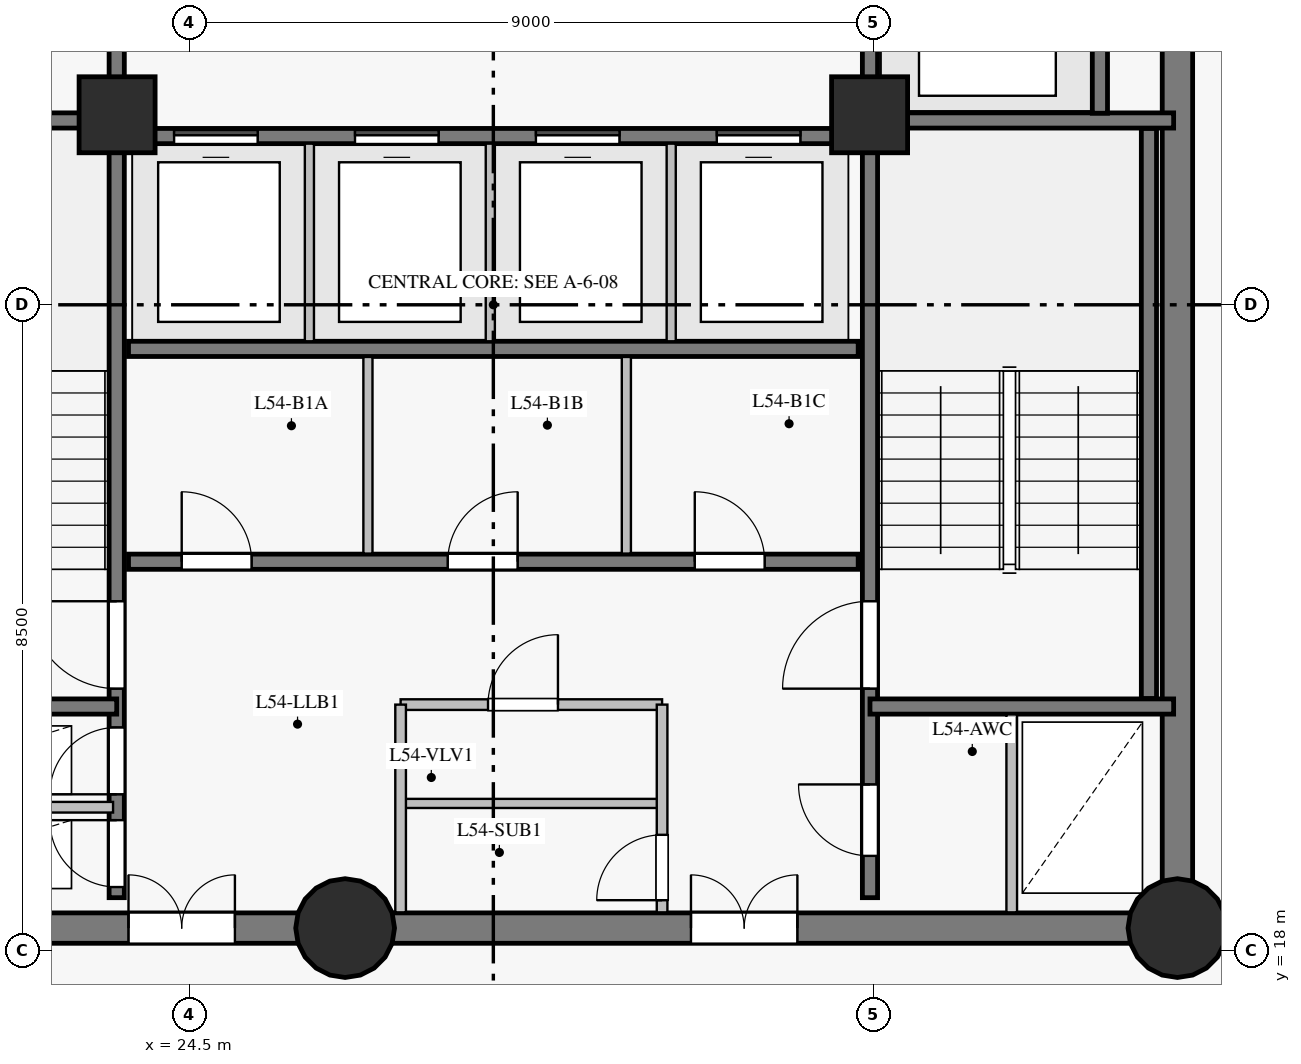
"""IFC4 building model, lengths in metres.
Left out: names, types, materials, properties, quantities, classifications, styles, units other than length and angle.
Written with IfcOpenShell. Run it as: python <this file> out.ifc"""

import sys

from ifc_helpers import new_model, si_unit, direction, frame, frame_2d, origin, origin_with_axes, origin_2d, place, context, subcontext, project, spatial, rectangle, circle, extrude, source, transform, mapped, element, fill, save


model = new_model("IFC4")
c1 = context("Model", 3, precision=1e-05, world=origin(), true_north=direction((0.0, 1.0)))
c2 = subcontext(c1, "Body", "Model", "MODEL_VIEW")
j1 = project(units=[si_unit("LENGTHUNIT", "METRE"), si_unit("PLANEANGLEUNIT", "RADIAN")], contexts=[c1])
p1 = place(None, origin())
s1 = spatial("IfcSite", under=j1, at=p1, CompositionType="ELEMENT")
p2 = place(p1, origin())
s2 = spatial("IfcBuilding", under=s1, at=p2, CompositionType="ELEMENT")
p3 = place(p2, frame((0.0, 0.0, 187.05)))
s3 = spatial("IfcBuildingStorey", under=s2, at=p3, CompositionType="ELEMENT", Elevation=187.05)
p4 = place(p3, frame((19.5, 18.3, 0.0), z_axis=(0.0, 0.0, 1.0), x_axis=(1.0, 0.0, 0.0)))
e1 = element("IfcWall", 1, at=p4, inside=s3, PredefinedType="SHEAR", context=c2, shape_type="SweptSolid", body=[
    extrude(rectangle(XDim=7.05, YDim=0.4, at=frame_2d((3.525, 0.0))), origin(), (0.0, 0.0, 1.0), 2.825),
])
p5 = place(p4, frame((4.2, 0.0, 0.0)))
e2 = element("IfcOpeningElement", 2, at=p5, cuts=e1, PredefinedType="OPENING", context=c2, shape_type="SweptSolid", body=[
    extrude(rectangle(XDim=1.4, YDim=2.2, at=frame_2d((0.7, 1.1))), frame((0.0, 0.21, 0.0), z_axis=(0.0, -1.0, 0.0), x_axis=(1.0, 0.0, 0.0)), (0.0, 0.0, 1.0), 0.42),
])
p6 = place(p3, frame((26.55, 18.3, 0.0), z_axis=(0.0, 0.0, 1.0), x_axis=(1.0, 0.0, 0.0)))
e3 = element("IfcWall", 3, at=p6, inside=s3, PredefinedType="SHEAR", context=c2, shape_type="SweptSolid", body=[
    extrude(rectangle(XDim=10.95, YDim=0.4, at=frame_2d((5.475, 0.0))), origin(), (0.0, 0.0, 1.0), 2.825),
])
p7 = place(p6, frame((4.55, 0.0, 0.0)))
e4 = element("IfcOpeningElement", 4, at=p7, cuts=e3, PredefinedType="OPENING", context=c2, shape_type="SweptSolid", body=[
    extrude(rectangle(XDim=1.4, YDim=2.2, at=frame_2d((0.7, 1.1))), frame((0.0, 0.21, 0.0), z_axis=(0.0, -1.0, 0.0), x_axis=(1.0, 0.0, 0.0)), (0.0, 0.0, 1.0), 0.42),
])
p8 = place(p3, frame((37.5, 18.3, 0.0), z_axis=(0.0, 0.0, 1.0), x_axis=(0.0, 1.0, 0.0)))
e5 = element("IfcWall", 5, at=p8, inside=s3, PredefinedType="SHEAR", context=c2, shape_type="SweptSolid", body=[
    extrude(rectangle(XDim=16.4, YDim=0.4, at=frame_2d((8.2, 0.0))), origin(), (0.0, 0.0, 1.0), 2.825),
])
p9 = place(p8, frame((14.15, 0.0, 0.0)))
e6 = element("IfcOpeningElement", 6, at=p9, cuts=e5, PredefinedType="OPENING", context=c2, shape_type="SweptSolid", body=[
    extrude(rectangle(XDim=1.2, YDim=2.15, at=frame_2d((0.6, 1.075))), frame((0.0, 0.21, 0.0), z_axis=(0.0, -1.0, 0.0), x_axis=(1.0, 0.0, 0.0)), (0.0, 0.0, 1.0), 0.42),
])
m1 = source(origin_with_axes(), c2, "Body", "SweptSolid", [
    extrude(circle(Radius=0.65, at=origin_2d()), origin(), (0.0, 0.0, 1.0), 3.05),
])
for number, where, z_axis, x_axis in (
    (7, (26.55, 18.3, 0.0), (0.0, 0.0, 1.0), (1.0, 0.0, 0.0)),
    (8, (37.5, 18.3, 0.0), (0.0, 0.0, 1.0), (1.0, 0.0, 0.0)),
):
    element("IfcColumn", number, at=place(p3, frame(where, z_axis=z_axis, x_axis=x_axis)), inside=s3, PredefinedType="COLUMN", context=c2, shape_type="MappedRepresentation", body=[
        mapped(m1, transform((0.0, 0.0, 0.0), scale=1.0)),
    ])
m2 = source(origin_with_axes(), c2, "Body", "SweptSolid", [
    extrude(rectangle(XDim=1.0, YDim=1.0, at=origin_2d()), origin(), (0.0, 0.0, 1.0), 3.05),
])
for number, where, z_axis, x_axis in (
    (9, (23.55, 29.0, 0.0), (0.0, 0.0, 1.0), (1.0, 0.0, 0.0)),
    (10, (33.45, 29.0, 0.0), (0.0, 0.0, 1.0), (1.0, 0.0, 0.0)),
):
    element("IfcColumn", number, at=place(p3, frame(where, z_axis=z_axis, x_axis=x_axis)), inside=s3, PredefinedType="COLUMN", context=c2, shape_type="MappedRepresentation", body=[
        mapped(m2, transform((0.0, 0.0, 0.0), scale=1.0)),
    ])
p10 = place(p3, frame((23.545, 18.7, 0.0), z_axis=(0.0, 0.0, 1.0), x_axis=(0.0, 1.0, 0.0)))
e11 = element("IfcWall", 11, at=p10, inside=s3, PredefinedType="SHEAR", context=c2, shape_type="SweptSolid", body=[
    extrude(rectangle(XDim=15.6, YDim=0.2, at=frame_2d((7.8, 0.0))), origin(), (0.0, 0.0, 1.0), 2.825),
])
p11 = place(p10, frame((2.75, 0.0, 0.0)))
e12 = element("IfcOpeningElement", 12, at=p11, cuts=e11, PredefinedType="OPENING", context=c2, shape_type="SweptSolid", body=[
    extrude(rectangle(XDim=1.15, YDim=2.15, at=frame_2d((0.575, 1.075))), frame((0.0, 0.11, 0.0), z_axis=(0.0, -1.0, 0.0), x_axis=(1.0, 0.0, 0.0)), (0.0, 0.0, 1.0), 0.22),
])
p12 = place(p10, frame((0.14, 0.0, 0.0)))
e13 = element("IfcOpeningElement", 13, at=p12, cuts=e11, PredefinedType="OPENING", context=c2, shape_type="SweptSolid", body=[
    extrude(rectangle(XDim=0.88, YDim=2.1, at=frame_2d((0.44, 1.05))), frame((0.0, 0.11, 0.0), z_axis=(0.0, -1.0, 0.0), x_axis=(1.0, 0.0, 0.0)), (0.0, 0.0, 1.0), 0.22),
])
p13 = place(p10, frame((1.36, 0.0, 0.0)))
e14 = element("IfcOpeningElement", 14, at=p13, cuts=e11, PredefinedType="OPENING", context=c2, shape_type="SweptSolid", body=[
    extrude(rectangle(XDim=0.88, YDim=2.1, at=frame_2d((0.44, 1.05))), frame((0.0, 0.11, 0.0), z_axis=(0.0, -1.0, 0.0), x_axis=(1.0, 0.0, 0.0)), (0.0, 0.0, 1.0), 0.22),
])
p14 = place(p10, frame((12.1, 0.0, 0.0)))
e15 = element("IfcOpeningElement", 15, at=p14, cuts=e11, PredefinedType="OPENING", context=c2, shape_type="SweptSolid", body=[
    extrude(rectangle(XDim=1.12, YDim=2.15, at=frame_2d((0.56, 1.075))), frame((0.0, 0.11, 0.0), z_axis=(0.0, -1.0, 0.0), x_axis=(1.0, 0.0, 0.0)), (0.0, 0.0, 1.0), 0.22),
])
p15 = place(p10, frame((14.05, 0.0, 0.0)))
e16 = element("IfcOpeningElement", 16, at=p15, cuts=e11, PredefinedType="OPENING", context=c2, shape_type="SweptSolid", body=[
    extrude(rectangle(XDim=1.12, YDim=2.15, at=frame_2d((0.56, 1.075))), frame((0.0, 0.11, 0.0), z_axis=(0.0, -1.0, 0.0), x_axis=(1.0, 0.0, 0.0)), (0.0, 0.0, 1.0), 0.22),
])
p16 = place(p3, frame((33.455, 18.7, 0.0), z_axis=(0.0, 0.0, 1.0), x_axis=(0.0, 1.0, 0.0)))
e17 = element("IfcWall", 17, at=p16, inside=s3, PredefinedType="SHEAR", context=c2, shape_type="SweptSolid", body=[
    extrude(rectangle(XDim=15.6, YDim=0.2, at=frame_2d((7.8, 0.0))), origin(), (0.0, 0.0, 1.0), 2.825),
])
p17 = place(p16, frame((2.75, 0.0, 0.0)))
e18 = element("IfcOpeningElement", 18, at=p17, cuts=e17, PredefinedType="OPENING", context=c2, shape_type="SweptSolid", body=[
    extrude(rectangle(XDim=1.15, YDim=2.15, at=frame_2d((0.575, 1.075))), frame((0.0, 0.11, 0.0), z_axis=(0.0, -1.0, 0.0), x_axis=(1.0, 0.0, 0.0)), (0.0, 0.0, 1.0), 0.22),
])
p18 = place(p16, frame((0.55, 0.0, 0.0)))
e19 = element("IfcOpeningElement", 19, at=p18, cuts=e17, PredefinedType="OPENING", context=c2, shape_type="SweptSolid", body=[
    extrude(rectangle(XDim=0.94, YDim=2.1, at=frame_2d((0.47, 1.05))), frame((0.0, 0.11, 0.0), z_axis=(0.0, -1.0, 0.0), x_axis=(1.0, 0.0, 0.0)), (0.0, 0.0, 1.0), 0.22),
])
p19 = place(p3, frame((23.7, 23.12, 0.0), z_axis=(0.0, 0.0, 1.0), x_axis=(1.0, 0.0, 0.0)))
e20 = element("IfcWall", 20, at=p19, inside=s3, PredefinedType="SHEAR", context=c2, shape_type="SweptSolid", body=[
    extrude(rectangle(XDim=9.6, YDim=0.2, at=frame_2d((4.8, 0.0))), origin(), (0.0, 0.0, 1.0), 2.825),
])
p20 = place(p19, frame((0.7, 0.0, 0.0)))
e21 = element("IfcOpeningElement", 21, at=p20, cuts=e20, PredefinedType="OPENING", context=c2, shape_type="SweptSolid", body=[
    extrude(rectangle(XDim=0.92, YDim=2.1, at=frame_2d((0.46, 1.05))), frame((0.0, 0.11, 0.0), z_axis=(0.0, -1.0, 0.0), x_axis=(1.0, 0.0, 0.0)), (0.0, 0.0, 1.0), 0.22),
])
p21 = place(p19, frame((4.2, 0.0, 0.0)))
e22 = element("IfcOpeningElement", 22, at=p21, cuts=e20, PredefinedType="OPENING", context=c2, shape_type="SweptSolid", body=[
    extrude(rectangle(XDim=0.92, YDim=2.1, at=frame_2d((0.46, 1.05))), frame((0.0, 0.11, 0.0), z_axis=(0.0, -1.0, 0.0), x_axis=(1.0, 0.0, 0.0)), (0.0, 0.0, 1.0), 0.22),
])
p22 = place(p19, frame((7.45, 0.0, 0.0)))
e23 = element("IfcOpeningElement", 23, at=p22, cuts=e20, PredefinedType="OPENING", context=c2, shape_type="SweptSolid", body=[
    extrude(rectangle(XDim=0.92, YDim=2.1, at=frame_2d((0.46, 1.05))), frame((0.0, 0.11, 0.0), z_axis=(0.0, -1.0, 0.0), x_axis=(1.0, 0.0, 0.0)), (0.0, 0.0, 1.0), 0.22),
])
p23 = place(p3, frame((23.7, 25.92, 0.0), z_axis=(0.0, 0.0, 1.0), x_axis=(1.0, 0.0, 0.0)))
e24 = element("IfcWall", 24, at=p23, inside=s3, PredefinedType="SHEAR", context=c2, shape_type="SweptSolid", body=[
    extrude(rectangle(XDim=9.6, YDim=0.2, at=frame_2d((4.8, 0.0))), origin(), (0.0, 0.0, 1.0), 2.825),
])
p24 = place(p3, frame((23.7, 28.72, 0.0), z_axis=(0.0, 0.0, 1.0), x_axis=(1.0, 0.0, 0.0)))
e25 = element("IfcWall", 25, at=p24, inside=s3, PredefinedType="SHEAR", context=c2, shape_type="SweptSolid", body=[
    extrude(rectangle(XDim=9.6, YDim=0.2, at=frame_2d((4.8, 0.0))), origin(), (0.0, 0.0, 1.0), 2.825),
])
p25 = place(p24, frame((0.6, 0.0, 0.0)))
e26 = element("IfcOpeningElement", 26, at=p25, cuts=e25, PredefinedType="OPENING", context=c2, shape_type="SweptSolid", body=[
    extrude(rectangle(XDim=1.1, YDim=2.15, at=frame_2d((0.55, 1.075))), frame((0.0, 0.11, 0.0), z_axis=(0.0, -1.0, 0.0), x_axis=(1.0, 0.0, 0.0)), (0.0, 0.0, 1.0), 0.22),
])
p26 = place(p24, frame((2.98, 0.0, 0.0)))
e27 = element("IfcOpeningElement", 27, at=p26, cuts=e25, PredefinedType="OPENING", context=c2, shape_type="SweptSolid", body=[
    extrude(rectangle(XDim=1.1, YDim=2.15, at=frame_2d((0.55, 1.075))), frame((0.0, 0.11, 0.0), z_axis=(0.0, -1.0, 0.0), x_axis=(1.0, 0.0, 0.0)), (0.0, 0.0, 1.0), 0.22),
])
p27 = place(p24, frame((5.36, 0.0, 0.0)))
e28 = element("IfcOpeningElement", 28, at=p27, cuts=e25, PredefinedType="OPENING", context=c2, shape_type="SweptSolid", body=[
    extrude(rectangle(XDim=1.1, YDim=2.15, at=frame_2d((0.55, 1.075))), frame((0.0, 0.11, 0.0), z_axis=(0.0, -1.0, 0.0), x_axis=(1.0, 0.0, 0.0)), (0.0, 0.0, 1.0), 0.22),
])
p28 = place(p24, frame((7.74, 0.0, 0.0)))
e29 = element("IfcOpeningElement", 29, at=p28, cuts=e25, PredefinedType="OPENING", context=c2, shape_type="SweptSolid", body=[
    extrude(rectangle(XDim=1.1, YDim=2.15, at=frame_2d((0.55, 1.075))), frame((0.0, 0.11, 0.0), z_axis=(0.0, -1.0, 0.0), x_axis=(1.0, 0.0, 0.0)), (0.0, 0.0, 1.0), 0.22),
])
p29 = place(p3, frame((37.125, 21.32, 0.0), z_axis=(0.0, 0.0, 1.0), x_axis=(0.0, 1.0, 0.0)))
e30 = element("IfcWall", 30, at=p29, inside=s3, PredefinedType="SHEAR", context=c2, shape_type="SweptSolid", body=[
    extrude(rectangle(XDim=7.5, YDim=0.2, at=frame_2d((3.75, 0.0))), origin(), (0.0, 0.0, 1.0), 2.825),
])
for number, where, z_axis, x_axis in (
    (31, (33.455, 21.215, 0.0), (0.0, 0.0, 1.0), (1.0, 0.0, 0.0)),
    (32, (33.455, 28.925, 0.0), (0.0, 0.0, 1.0), (1.0, 0.0, 0.0)),
    (33, (19.55, 21.215, 0.0), (0.0, 0.0, 1.0), (1.0, 0.0, 0.0)),
    (34, (19.55, 28.925, 0.0), (0.0, 0.0, 1.0), (1.0, 0.0, 0.0)),
):
    element("IfcWall", number, at=place(p3, frame(where, z_axis=z_axis, x_axis=x_axis)), inside=s3, PredefinedType="SHEAR", context=c2, shape_type="SweptSolid", body=[
        extrude(rectangle(XDim=3.995, YDim=0.2, at=frame_2d((1.998, 0.0))), origin(), (0.0, 0.0, 1.0), 2.825),
    ])
p30 = place(p3, frame((36.48, 29.02, 0.0), z_axis=(0.0, 0.0, 1.0), x_axis=(0.0, 1.0, 0.0)))
e35 = element("IfcWall", 35, at=p30, inside=s3, PredefinedType="SHEAR", context=c2, shape_type="SweptSolid", body=[
    extrude(rectangle(XDim=2.86, YDim=0.2, at=frame_2d((1.43, 0.0))), origin(), (0.0, 0.0, 1.0), 2.825),
])
p31 = place(p3, frame((19.707, 19.89, 0.0), z_axis=(0.0, 0.0, 1.0), x_axis=(1.0, 0.0, 0.0)))
e36 = element("IfcWall", 36, at=p31, inside=s3, PredefinedType="PARTITIONING", context=c2, shape_type="SweptSolid", body=[
    extrude(rectangle(XDim=3.79, YDim=0.14, at=frame_2d((1.895, 0.0))), origin(), (0.0, 0.0, 1.0), 2.825),
])
p32 = place(p3, frame((27.28, 21.24, 0.0), z_axis=(0.0, 0.0, 1.0), x_axis=(1.0, 0.0, 0.0)))
e37 = element("IfcWall", 37, at=p32, inside=s3, PredefinedType="PARTITIONING", context=c2, shape_type="SweptSolid", body=[
    extrude(rectangle(XDim=3.44, YDim=0.14, at=frame_2d((1.72, 0.0))), origin(), (0.0, 0.0, 1.0), 2.825),
])
p33 = place(p32, frame((1.15, 0.0, 0.0)))
e38 = element("IfcOpeningElement", 38, at=p33, cuts=e37, PredefinedType="OPENING", context=c2, shape_type="SweptSolid", body=[
    extrude(rectangle(XDim=0.92, YDim=2.1, at=frame_2d((0.46, 1.05))), frame((0.0, 0.08, 0.0), z_axis=(0.0, -1.0, 0.0), x_axis=(1.0, 0.0, 0.0)), (0.0, 0.0, 1.0), 0.16),
])
p34 = place(p3, frame((27.28, 19.94, 0.0), z_axis=(0.0, 0.0, 1.0), x_axis=(1.0, 0.0, 0.0)))
e39 = element("IfcWall", 39, at=p34, inside=s3, PredefinedType="PARTITIONING", context=c2, shape_type="SweptSolid", body=[
    extrude(rectangle(XDim=3.44, YDim=0.12, at=frame_2d((1.72, 0.0))), origin(), (0.0, 0.0, 1.0), 2.825),
])
p35 = place(p3, frame((27.28, 18.507, 0.0), z_axis=(0.0, 0.0, 1.0), x_axis=(0.0, 1.0, 0.0)))
e40 = element("IfcWall", 40, at=p35, inside=s3, PredefinedType="PARTITIONING", context=c2, shape_type="SweptSolid", body=[
    extrude(rectangle(XDim=2.733, YDim=0.14, at=frame_2d((1.366, 0.0))), origin(), (0.0, 0.0, 1.0), 2.825),
])
p36 = place(p3, frame((30.72, 18.507, 0.0), z_axis=(0.0, 0.0, 1.0), x_axis=(0.0, 1.0, 0.0)))
e41 = element("IfcWall", 41, at=p36, inside=s3, PredefinedType="PARTITIONING", context=c2, shape_type="SweptSolid", body=[
    extrude(rectangle(XDim=2.733, YDim=0.14, at=frame_2d((1.366, 0.0))), origin(), (0.0, 0.0, 1.0), 2.825),
])
p37 = place(p36, frame((0.16, 0.0, 0.0)))
e42 = element("IfcOpeningElement", 42, at=p37, cuts=e41, PredefinedType="OPENING", context=c2, shape_type="SweptSolid", body=[
    extrude(rectangle(XDim=0.86, YDim=2.1, at=frame_2d((0.43, 1.05))), frame((0.0, 0.08, 0.0), z_axis=(0.0, -1.0, 0.0), x_axis=(1.0, 0.0, 0.0)), (0.0, 0.0, 1.0), 0.16),
])
for number, where, z_axis, x_axis in (
    (43, (26.08, 26.02, 0.0), (0.0, 0.0, 1.0), (0.0, 1.0, 0.0)),
    (44, (28.46, 26.02, 0.0), (0.0, 0.0, 1.0), (0.0, 1.0, 0.0)),
    (45, (30.84, 26.02, 0.0), (0.0, 0.0, 1.0), (0.0, 1.0, 0.0)),
):
    element("IfcWall", number, at=place(p3, frame(where, z_axis=z_axis, x_axis=x_axis)), inside=s3, PredefinedType="PARTITIONING", context=c2, shape_type="SweptSolid", body=[
        extrude(rectangle(XDim=2.6, YDim=0.12, at=frame_2d((1.3, 0.0))), origin(), (0.0, 0.0, 1.0), 2.825),
    ])
for number, where, z_axis, x_axis in (
    (46, (26.85, 23.227, 0.0), (0.0, 0.0, 1.0), (0.0, 1.0, 0.0)),
    (47, (30.25, 23.227, 0.0), (0.0, 0.0, 1.0), (0.0, 1.0, 0.0)),
):
    element("IfcWall", number, at=place(p3, frame(where, z_axis=z_axis, x_axis=x_axis)), inside=s3, PredefinedType="PARTITIONING", context=c2, shape_type="SweptSolid", body=[
        extrude(rectangle(XDim=2.587, YDim=0.12, at=frame_2d((1.293, 0.0))), origin(), (0.0, 0.0, 1.0), 2.825),
    ])
p38 = place(p3, frame((35.32, 18.507, 0.0), z_axis=(0.0, 0.0, 1.0), x_axis=(0.0, 1.0, 0.0)))
e48 = element("IfcWall", 48, at=p38, inside=s3, PredefinedType="PARTITIONING", context=c2, shape_type="SweptSolid", body=[
    extrude(rectangle(XDim=2.604, YDim=0.14, at=frame_2d((1.302, 0.0))), origin(), (0.0, 0.0, 1.0), 2.825),
])
m3 = source(origin_with_axes(), c2, "Body", "SweptSolid", [
    extrude(rectangle(XDim=1.15, YDim=2.15, at=frame_2d((0.575, 1.075))), frame((0.0, 0.025, 0.0), z_axis=(0.0, -1.0, 0.0), x_axis=(1.0, 0.0, 0.0)), (0.0, 0.0, 1.0), 0.05),
])
p39 = place(p11, origin())
e49 = element("IfcDoor", 49, at=p39, inside=s3, OperationType="SINGLE_SWING_RIGHT", PredefinedType="DOOR", context=c2, shape_type="MappedRepresentation", body=[
    mapped(m3, transform((0.0, 0.0, 0.0), scale=1.0)),
])
fill(e12, e49)
p40 = place(p17, origin())
e50 = element("IfcDoor", 50, at=p40, inside=s3, OperationType="SINGLE_SWING_LEFT", PredefinedType="DOOR", context=c2, shape_type="MappedRepresentation", body=[
    mapped(m3, transform((0.0, 0.0, 0.0), scale=1.0)),
])
fill(e18, e50)
m4 = source(origin_with_axes(), c2, "Body", "SweptSolid", [
    extrude(rectangle(XDim=0.88, YDim=2.1, at=frame_2d((0.44, 1.05))), frame((0.0, 0.025, 0.0), z_axis=(0.0, -1.0, 0.0), x_axis=(1.0, 0.0, 0.0)), (0.0, 0.0, 1.0), 0.05),
])
p41 = place(p12, origin())
e51 = element("IfcDoor", 51, at=p41, inside=s3, OperationType="SINGLE_SWING_RIGHT", PredefinedType="DOOR", context=c2, shape_type="MappedRepresentation", body=[
    mapped(m4, transform((0.0, 0.0, 0.0), scale=1.0)),
])
fill(e13, e51)
p42 = place(p13, origin())
e52 = element("IfcDoor", 52, at=p42, inside=s3, OperationType="SINGLE_SWING_LEFT", PredefinedType="DOOR", context=c2, shape_type="MappedRepresentation", body=[
    mapped(m4, transform((0.0, 0.0, 0.0), scale=1.0)),
])
fill(e14, e52)
m5 = source(origin_with_axes(), c2, "Body", "SweptSolid", [
    extrude(rectangle(XDim=1.4, YDim=2.2, at=frame_2d((0.7, 1.1))), frame((0.0, 0.025, 0.0), z_axis=(0.0, -1.0, 0.0), x_axis=(1.0, 0.0, 0.0)), (0.0, 0.0, 1.0), 0.05),
])
p43 = place(p5, origin())
e53 = element("IfcDoor", 53, at=p43, inside=s3, OperationType="DOUBLE_DOOR_SINGLE_SWING", PredefinedType="DOOR", context=c2, shape_type="MappedRepresentation", body=[
    mapped(m5, transform((0.0, 0.0, 0.0), scale=1.0)),
])
fill(e2, e53)
p44 = place(p7, origin())
e54 = element("IfcDoor", 54, at=p44, inside=s3, OperationType="DOUBLE_DOOR_SINGLE_SWING", PredefinedType="DOOR", context=c2, shape_type="MappedRepresentation", body=[
    mapped(m5, transform((0.0, 0.0, 0.0), scale=1.0)),
])
fill(e4, e54)
m6 = source(origin_with_axes(), c2, "Body", "SweptSolid", [
    extrude(rectangle(XDim=0.94, YDim=2.1, at=frame_2d((0.47, 1.05))), frame((0.0, 0.025, 0.0), z_axis=(0.0, -1.0, 0.0), x_axis=(1.0, 0.0, 0.0)), (0.0, 0.0, 1.0), 0.05),
])
p45 = place(p18, origin())
e55 = element("IfcDoor", 55, at=p45, inside=s3, OperationType="SINGLE_SWING_RIGHT", PredefinedType="DOOR", context=c2, shape_type="MappedRepresentation", body=[
    mapped(m6, transform((0.0, 0.0, 0.0), scale=1.0)),
])
fill(e19, e55)
m7 = source(origin_with_axes(), c2, "Body", "SweptSolid", [
    extrude(rectangle(XDim=0.86, YDim=2.1, at=frame_2d((0.43, 1.05))), frame((0.0, 0.025, 0.0), z_axis=(0.0, -1.0, 0.0), x_axis=(1.0, 0.0, 0.0)), (0.0, 0.0, 1.0), 0.05),
])
p46 = place(p37, origin())
e56 = element("IfcDoor", 56, at=p46, inside=s3, OperationType="SINGLE_SWING_LEFT", PredefinedType="DOOR", context=c2, shape_type="MappedRepresentation", body=[
    mapped(m7, transform((0.0, 0.0, 0.0), scale=1.0)),
])
fill(e42, e56)
m8 = source(origin_with_axes(), c2, "Body", "SweptSolid", [
    extrude(rectangle(XDim=0.92, YDim=2.1, at=frame_2d((0.46, 1.05))), frame((0.0, 0.025, 0.0), z_axis=(0.0, -1.0, 0.0), x_axis=(1.0, 0.0, 0.0)), (0.0, 0.0, 1.0), 0.05),
])
p47 = place(p33, origin())
e57 = element("IfcDoor", 57, at=p47, inside=s3, OperationType="SINGLE_SWING_RIGHT", PredefinedType="DOOR", context=c2, shape_type="MappedRepresentation", body=[
    mapped(m8, transform((0.0, 0.0, 0.0), scale=1.0)),
])
fill(e38, e57)
p48 = place(p20, origin())
e58 = element("IfcDoor", 58, at=p48, inside=s3, OperationType="SINGLE_SWING_LEFT", PredefinedType="DOOR", context=c2, shape_type="MappedRepresentation", body=[
    mapped(m8, transform((0.0, 0.0, 0.0), scale=1.0)),
])
fill(e21, e58)
p49 = place(p21, origin())
e59 = element("IfcDoor", 59, at=p49, inside=s3, OperationType="SINGLE_SWING_RIGHT", PredefinedType="DOOR", context=c2, shape_type="MappedRepresentation", body=[
    mapped(m8, transform((0.0, 0.0, 0.0), scale=1.0)),
])
fill(e22, e59)
p50 = place(p22, origin())
e60 = element("IfcDoor", 60, at=p50, inside=s3, OperationType="SINGLE_SWING_LEFT", PredefinedType="DOOR", context=c2, shape_type="MappedRepresentation", body=[
    mapped(m8, transform((0.0, 0.0, 0.0), scale=1.0)),
])
fill(e23, e60)
m9 = source(origin_with_axes(), c2, "Body", "SweptSolid", [
    extrude(rectangle(XDim=1.1, YDim=2.15, at=frame_2d((0.55, 1.075))), frame((0.0, 0.025, 0.0), z_axis=(0.0, -1.0, 0.0), x_axis=(1.0, 0.0, 0.0)), (0.0, 0.0, 1.0), 0.05),
])
p51 = place(p25, origin())
e61 = element("IfcDoor", 61, at=p51, inside=s3, OperationType="SLIDING_TO_LEFT", PredefinedType="DOOR", context=c2, shape_type="MappedRepresentation", body=[
    mapped(m9, transform((0.0, 0.0, 0.0), scale=1.0)),
])
fill(e26, e61)
p52 = place(p26, origin())
e62 = element("IfcDoor", 62, at=p52, inside=s3, OperationType="SLIDING_TO_RIGHT", PredefinedType="DOOR", context=c2, shape_type="MappedRepresentation", body=[
    mapped(m9, transform((0.0, 0.0, 0.0), scale=1.0)),
])
fill(e27, e62)
p53 = place(p27, origin())
e63 = element("IfcDoor", 63, at=p53, inside=s3, OperationType="SLIDING_TO_LEFT", PredefinedType="DOOR", context=c2, shape_type="MappedRepresentation", body=[
    mapped(m9, transform((0.0, 0.0, 0.0), scale=1.0)),
])
fill(e28, e63)
p54 = place(p28, origin())
e64 = element("IfcDoor", 64, at=p54, inside=s3, OperationType="SLIDING_TO_RIGHT", PredefinedType="DOOR", context=c2, shape_type="MappedRepresentation", body=[
    mapped(m9, transform((0.0, 0.0, 0.0), scale=1.0)),
])
fill(e29, e64)
save(model, sys.argv[1])
